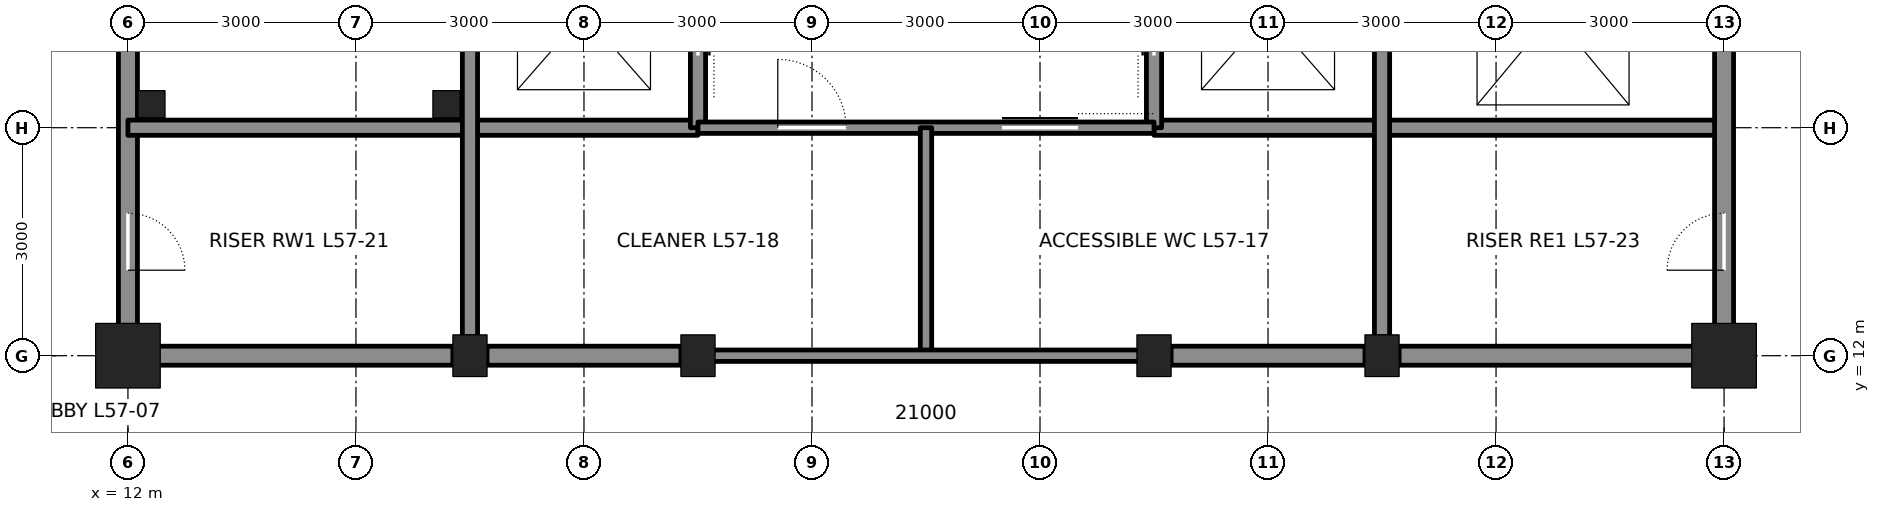
"""IFC4 building model, lengths in metres.
Left out: names, types, materials, properties, quantities, classifications, styles, units other than length and angle.
Written with IfcOpenShell. Run it as: python <this file> out.ifc"""

import sys

from ifc_helpers import new_model, si_unit, direction, frame, frame_2d, origin, origin_2d, place, context, subcontext, project, spatial, rectangle, hollow_rectangle, i_section, extrude, element, fill, save


model = new_model("IFC4")
c1 = context("Model", 3, precision=1e-05, world=origin(), true_north=direction((0.0, 1.0)))
c2 = subcontext(c1, "Body", "Model", "MODEL_VIEW")
j1 = project(units=[si_unit("LENGTHUNIT", "METRE"), si_unit("PLANEANGLEUNIT", "RADIAN")], contexts=[c1])
p1 = place(None, origin())
s1 = spatial("IfcSite", under=j1, at=p1, CompositionType="ELEMENT")
p2 = place(p1, origin())
s2 = spatial("IfcBuilding", under=s1, at=p2, CompositionType="ELEMENT")
p3 = place(p2, frame((0.0, 0.0, 257.7)))
s3 = spatial("IfcBuildingStorey", under=s2, at=p3, CompositionType="ELEMENT", Elevation=257.7)
p4 = place(p3, frame((12.0, 12.0, 0.0), z_axis=(0.0, 0.0, 1.0), x_axis=(1.0, 0.0, 0.0)))
e1 = element("IfcColumn", 1, at=p4, inside=s3, PredefinedType="COLUMN", context=c2, shape_type="SweptSolid", body=[
    extrude(hollow_rectangle(XDim=0.85, YDim=0.85, WallThickness=0.085, at=origin_2d()), origin(), (0.0, 0.0, 1.0), 4.5),
])
for number, where, z_axis, x_axis in (
    (2, (16.5, 12.0, 0.0), (0.0, 0.0, 1.0), (1.0, 0.0, 0.0)),
    (3, (19.5, 12.0, 0.0), (0.0, 0.0, 1.0), (1.0, 0.0, 0.0)),
    (4, (25.5, 12.0, 0.0), (0.0, 0.0, 1.0), (1.0, 0.0, 0.0)),
    (5, (28.5, 12.0, 0.0), (0.0, 0.0, 1.0), (1.0, 0.0, 0.0)),
):
    element("IfcColumn", number, at=place(p3, frame(where, z_axis=z_axis, x_axis=x_axis)), inside=s3, PredefinedType="COLUMN", context=c2, shape_type="SweptSolid", body=[
        extrude(i_section(OverallWidth=0.449, OverallDepth=0.549, WebThickness=0.072, FlangeThickness=0.115, at=origin_2d()), origin(), (0.0, 0.0, 1.0), 4.5),
    ])
p5 = place(p3, frame((33.0, 12.0, 0.0), z_axis=(0.0, 0.0, 1.0), x_axis=(1.0, 0.0, 0.0)))
e6 = element("IfcColumn", 6, at=p5, inside=s3, PredefinedType="COLUMN", context=c2, shape_type="SweptSolid", body=[
    extrude(hollow_rectangle(XDim=0.85, YDim=0.85, WallThickness=0.085, at=origin_2d()), origin(), (0.0, 0.0, 1.0), 4.5),
])
p6 = place(p3, frame((12.0, 12.25, 0.0), z_axis=(0.0, 0.0, 1.0), x_axis=(0.0, 1.0, 0.0)))
e7 = element("IfcWall", 7, at=p6, inside=s3, PredefinedType="SOLIDWALL", context=c2, shape_type="SweptSolid", body=[
    extrude(rectangle(XDim=8.5, YDim=0.25, at=frame_2d((4.25, 0.0))), origin(), (0.0, 0.0, 1.0), 3.413),
])
p7 = place(p6, frame((0.875, 0.0, 0.0)))
e8 = element("IfcOpeningElement", 8, at=p7, cuts=e7, PredefinedType="OPENING", context=c2, shape_type="SweptSolid", body=[
    extrude(rectangle(XDim=0.75, YDim=2.1, at=frame_2d((0.375, 1.05))), frame((0.0, 0.135, 0.0), z_axis=(0.0, -1.0, 0.0), x_axis=(1.0, 0.0, 0.0)), (0.0, 0.0, 1.0), 0.27),
])
p8 = place(p3, frame((12.25, 12.0, 0.0), z_axis=(0.0, 0.0, 1.0), x_axis=(1.0, 0.0, 0.0)))
e9 = element("IfcWall", 9, at=p8, inside=s3, PredefinedType="SOLIDWALL", context=c2, shape_type="SweptSolid", body=[
    extrude(rectangle(XDim=4.025, YDim=0.25, at=frame_2d((2.013, 0.0))), origin(), (0.0, 0.0, 1.0), 3.481),
])
for number, where, z_axis, x_axis in (
    (10, (16.725, 12.0, 0.0), (0.0, 0.0, 1.0), (1.0, 0.0, 0.0)),
    (11, (25.725, 12.0, 0.0), (0.0, 0.0, 1.0), (1.0, 0.0, 0.0)),
):
    element("IfcWall", number, at=place(p3, frame(where, z_axis=z_axis, x_axis=x_axis)), inside=s3, PredefinedType="SOLIDWALL", context=c2, shape_type="SweptSolid", body=[
        extrude(rectangle(XDim=2.55, YDim=0.25, at=frame_2d((1.275, 0.0))), origin(), (0.0, 0.0, 1.0), 3.481),
    ])
p9 = place(p3, frame((28.725, 12.0, 0.0), z_axis=(0.0, 0.0, 1.0), x_axis=(1.0, 0.0, 0.0)))
e12 = element("IfcWall", 12, at=p9, inside=s3, PredefinedType="SOLIDWALL", context=c2, shape_type="SweptSolid", body=[
    extrude(rectangle(XDim=4.025, YDim=0.25, at=frame_2d((2.013, 0.0))), origin(), (0.0, 0.0, 1.0), 3.481),
])
for number, where, z_axis, x_axis in (
    (13, (12.0, 15.0, 0.0), (0.0, 0.0, 1.0), (1.0, 0.0, 0.0)),
    (14, (25.5, 15.0, 0.0), (0.0, 0.0, 1.0), (1.0, 0.0, 0.0)),
):
    element("IfcWall", number, at=place(p3, frame(where, z_axis=z_axis, x_axis=x_axis)), inside=s3, PredefinedType="SOLIDWALL", context=c2, shape_type="SweptSolid", body=[
        extrude(rectangle(XDim=7.5, YDim=0.2, at=frame_2d((3.75, 0.0))), origin(), (0.0, 0.0, 1.0), 4.34),
    ])
p10 = place(p3, frame((16.5, 12.25, 0.0), z_axis=(0.0, 0.0, 1.0), x_axis=(0.0, 1.0, 0.0)))
e15 = element("IfcWall", 15, at=p10, inside=s3, PredefinedType="SOLIDWALL", context=c2, shape_type="SweptSolid", body=[
    extrude(rectangle(XDim=8.5, YDim=0.2, at=frame_2d((4.25, 0.0))), origin(), (0.0, 0.0, 1.0), 3.413),
])
p11 = place(p3, frame((19.5, 15.0, 0.0), z_axis=(0.0, 0.0, 1.0), x_axis=(0.0, 1.0, 0.0)))
e16 = element("IfcWall", 16, at=p11, inside=s3, PredefinedType="SOLIDWALL", context=c2, shape_type="SweptSolid", body=[
    extrude(rectangle(XDim=12.0, YDim=0.2, at=frame_2d((6.0, 0.0))), origin(), (0.0, 0.0, 1.0), 3.365),
])
p12 = place(p11, frame((0.95, 0.0, 0.0)))
e17 = element("IfcOpeningElement", 17, at=p12, cuts=e16, PredefinedType="OPENING", context=c2, shape_type="SweptSolid", body=[
    extrude(rectangle(XDim=1.1, YDim=2.1, at=frame_2d((0.55, 1.05))), frame((0.0, 0.11, 0.0), z_axis=(0.0, -1.0, 0.0), x_axis=(1.0, 0.0, 0.0)), (0.0, 0.0, 1.0), 0.22),
])
p13 = place(p11, frame((3.95, 0.0, 0.0)))
e18 = element("IfcOpeningElement", 18, at=p13, cuts=e16, PredefinedType="OPENING", context=c2, shape_type="SweptSolid", body=[
    extrude(rectangle(XDim=1.1, YDim=2.1, at=frame_2d((0.55, 1.05))), frame((0.0, 0.11, 0.0), z_axis=(0.0, -1.0, 0.0), x_axis=(1.0, 0.0, 0.0)), (0.0, 0.0, 1.0), 0.22),
])
p14 = place(p11, frame((6.95, 0.0, 0.0)))
e19 = element("IfcOpeningElement", 19, at=p14, cuts=e16, PredefinedType="OPENING", context=c2, shape_type="SweptSolid", body=[
    extrude(rectangle(XDim=1.1, YDim=2.1, at=frame_2d((0.55, 1.05))), frame((0.0, 0.11, 0.0), z_axis=(0.0, -1.0, 0.0), x_axis=(1.0, 0.0, 0.0)), (0.0, 0.0, 1.0), 0.22),
])
p15 = place(p11, frame((9.95, 0.0, 0.0)))
e20 = element("IfcOpeningElement", 20, at=p15, cuts=e16, PredefinedType="OPENING", context=c2, shape_type="SweptSolid", body=[
    extrude(rectangle(XDim=1.1, YDim=2.1, at=frame_2d((0.55, 1.05))), frame((0.0, 0.11, 0.0), z_axis=(0.0, -1.0, 0.0), x_axis=(1.0, 0.0, 0.0)), (0.0, 0.0, 1.0), 0.22),
])
p16 = place(p3, frame((25.5, 15.0, 0.0), z_axis=(0.0, 0.0, 1.0), x_axis=(0.0, 1.0, 0.0)))
e21 = element("IfcWall", 21, at=p16, inside=s3, PredefinedType="SOLIDWALL", context=c2, shape_type="SweptSolid", body=[
    extrude(rectangle(XDim=12.0, YDim=0.2, at=frame_2d((6.0, 0.0))), origin(), (0.0, 0.0, 1.0), 3.365),
])
p17 = place(p16, frame((0.95, 0.0, 0.0)))
e22 = element("IfcOpeningElement", 22, at=p17, cuts=e21, PredefinedType="OPENING", context=c2, shape_type="SweptSolid", body=[
    extrude(rectangle(XDim=1.1, YDim=2.1, at=frame_2d((0.55, 1.05))), frame((0.0, 0.11, 0.0), z_axis=(0.0, -1.0, 0.0), x_axis=(1.0, 0.0, 0.0)), (0.0, 0.0, 1.0), 0.22),
])
p18 = place(p16, frame((3.95, 0.0, 0.0)))
e23 = element("IfcOpeningElement", 23, at=p18, cuts=e21, PredefinedType="OPENING", context=c2, shape_type="SweptSolid", body=[
    extrude(rectangle(XDim=1.1, YDim=2.1, at=frame_2d((0.55, 1.05))), frame((0.0, 0.11, 0.0), z_axis=(0.0, -1.0, 0.0), x_axis=(1.0, 0.0, 0.0)), (0.0, 0.0, 1.0), 0.22),
])
p19 = place(p16, frame((6.95, 0.0, 0.0)))
e24 = element("IfcOpeningElement", 24, at=p19, cuts=e21, PredefinedType="OPENING", context=c2, shape_type="SweptSolid", body=[
    extrude(rectangle(XDim=1.1, YDim=2.1, at=frame_2d((0.55, 1.05))), frame((0.0, 0.11, 0.0), z_axis=(0.0, -1.0, 0.0), x_axis=(1.0, 0.0, 0.0)), (0.0, 0.0, 1.0), 0.22),
])
p20 = place(p16, frame((9.95, 0.0, 0.0)))
e25 = element("IfcOpeningElement", 25, at=p20, cuts=e21, PredefinedType="OPENING", context=c2, shape_type="SweptSolid", body=[
    extrude(rectangle(XDim=1.1, YDim=2.1, at=frame_2d((0.55, 1.05))), frame((0.0, 0.11, 0.0), z_axis=(0.0, -1.0, 0.0), x_axis=(1.0, 0.0, 0.0)), (0.0, 0.0, 1.0), 0.22),
])
p21 = place(p3, frame((28.5, 12.25, 0.0), z_axis=(0.0, 0.0, 1.0), x_axis=(0.0, 1.0, 0.0)))
e26 = element("IfcWall", 26, at=p21, inside=s3, PredefinedType="SOLIDWALL", context=c2, shape_type="SweptSolid", body=[
    extrude(rectangle(XDim=8.5, YDim=0.2, at=frame_2d((4.25, 0.0))), origin(), (0.0, 0.0, 1.0), 3.413),
])
p22 = place(p3, frame((33.0, 12.25, 0.0), z_axis=(0.0, 0.0, 1.0), x_axis=(0.0, 1.0, 0.0)))
e27 = element("IfcWall", 27, at=p22, inside=s3, PredefinedType="SOLIDWALL", context=c2, shape_type="SweptSolid", body=[
    extrude(rectangle(XDim=8.5, YDim=0.25, at=frame_2d((4.25, 0.0))), origin(), (0.0, 0.0, 1.0), 3.413),
])
p23 = place(p22, frame((6.65, 0.0, 0.0)))
e28 = element("IfcOpeningElement", 28, at=p23, cuts=e27, PredefinedType="OPENING", context=c2, shape_type="SweptSolid", body=[
    extrude(rectangle(XDim=1.2, YDim=2.1, at=frame_2d((0.6, 1.05))), frame((0.0, 0.135, 0.0), z_axis=(0.0, -1.0, 0.0), x_axis=(1.0, 0.0, 0.0)), (0.0, 0.0, 1.0), 0.27),
])
p24 = place(p22, frame((0.875, 0.0, 0.0)))
e29 = element("IfcOpeningElement", 29, at=p24, cuts=e27, PredefinedType="OPENING", context=c2, shape_type="SweptSolid", body=[
    extrude(rectangle(XDim=0.75, YDim=2.1, at=frame_2d((0.375, 1.05))), frame((0.0, 0.135, 0.0), z_axis=(0.0, -1.0, 0.0), x_axis=(1.0, 0.0, 0.0)), (0.0, 0.0, 1.0), 0.27),
])
p25 = place(p3, frame((19.5, 15.0, 0.0), z_axis=(0.0, 0.0, 1.0), x_axis=(1.0, 0.0, 0.0)))
e30 = element("IfcWall", 30, at=p25, inside=s3, PredefinedType="PARTITIONING", context=c2, shape_type="SweptSolid", body=[
    extrude(rectangle(XDim=6.0, YDim=0.15, at=frame_2d((3.0, 0.0))), origin(), (0.0, 0.0, 1.0), 4.34),
])
p26 = place(p25, frame((4.0, 0.0, 0.0)))
e31 = element("IfcOpeningElement", 31, at=p26, cuts=e30, PredefinedType="OPENING", context=c2, shape_type="SweptSolid", body=[
    extrude(rectangle(XDim=1.0, YDim=2.1, at=frame_2d((0.5, 1.05))), frame((0.0, 0.085, 0.0), z_axis=(0.0, -1.0, 0.0), x_axis=(1.0, 0.0, 0.0)), (0.0, 0.0, 1.0), 0.17),
])
p27 = place(p25, frame((1.05, 0.0, 0.0)))
e32 = element("IfcOpeningElement", 32, at=p27, cuts=e30, PredefinedType="OPENING", context=c2, shape_type="SweptSolid", body=[
    extrude(rectangle(XDim=0.9, YDim=2.1, at=frame_2d((0.45, 1.05))), frame((0.0, 0.085, 0.0), z_axis=(0.0, -1.0, 0.0), x_axis=(1.0, 0.0, 0.0)), (0.0, 0.0, 1.0), 0.17),
])
p28 = place(p3, frame((22.5, 15.0, 0.0), z_axis=(0.0, 0.0, 1.0), x_axis=(0.0, -1.0, 0.0)))
e33 = element("IfcWall", 33, at=p28, inside=s3, PredefinedType="PARTITIONING", context=c2, shape_type="SweptSolid", body=[
    extrude(rectangle(XDim=3.0, YDim=0.15, at=frame_2d((1.5, 0.0))), origin(), (0.0, 0.0, 1.0), 4.34),
])
p29 = place(p3, frame((19.5, 12.0, 0.0), z_axis=(0.0, 0.0, 1.0), x_axis=(1.0, 0.0, 0.0)))
e34 = element("IfcWall", 34, at=p29, inside=s3, PredefinedType="PARTITIONING", context=c2, shape_type="SweptSolid", body=[
    extrude(rectangle(XDim=6.0, YDim=0.15, at=frame_2d((3.0, 0.0))), origin(), (0.0, 0.0, 1.0), 3.481),
])
for number, where, z_axis, x_axis in (
    (35, (12.31, 15.31, 0.0), (0.0, 0.0, 1.0), (1.0, 0.0, 0.0)),
    (36, (16.19, 15.31, 0.0), (0.0, 0.0, 1.0), (1.0, 0.0, 0.0)),
):
    element("IfcColumn", number, at=place(p3, frame(where, z_axis=z_axis, x_axis=x_axis)), inside=s3, PredefinedType="COLUMN", context=c2, shape_type="SweptSolid", body=[
        extrude(hollow_rectangle(XDim=0.356, YDim=0.356, WallThickness=0.009, at=origin_2d()), origin(), (0.0, 0.0, 1.0), 4.5),
    ])
p30 = place(p7, frame((0.75, 0.0, 0.0), z_axis=(0.0, 0.0, 1.0), x_axis=(-1.0, 0.0, 0.0)))
e37 = element("IfcDoor", 37, at=p30, inside=s3, OperationType="SINGLE_SWING_RIGHT", PredefinedType="DOOR", context=c2, shape_type="SweptSolid", body=[
    extrude(rectangle(XDim=0.75, YDim=2.1, at=frame_2d((0.375, 1.05))), frame((0.0, 0.025, 0.0), z_axis=(0.0, -1.0, 0.0), x_axis=(1.0, 0.0, 0.0)), (0.0, 0.0, 1.0), 0.05),
])
fill(e8, e37)
p31 = place(p24, origin())
e38 = element("IfcDoor", 38, at=p31, inside=s3, OperationType="SINGLE_SWING_LEFT", PredefinedType="DOOR", context=c2, shape_type="SweptSolid", body=[
    extrude(rectangle(XDim=0.75, YDim=2.1, at=frame_2d((0.375, 1.05))), frame((0.0, 0.025, 0.0), z_axis=(0.0, -1.0, 0.0), x_axis=(1.0, 0.0, 0.0)), (0.0, 0.0, 1.0), 0.05),
])
fill(e29, e38)
p32 = place(p26, origin())
e39 = element("IfcDoor", 39, at=p32, inside=s3, OperationType="SLIDING_TO_LEFT", PredefinedType="DOOR", context=c2, shape_type="SweptSolid", body=[
    extrude(rectangle(XDim=1.0, YDim=2.1, at=frame_2d((0.5, 1.05))), frame((0.0, 0.025, 0.0), z_axis=(0.0, -1.0, 0.0), x_axis=(1.0, 0.0, 0.0)), (0.0, 0.0, 1.0), 0.05),
])
fill(e31, e39)
p33 = place(p27, origin())
e40 = element("IfcDoor", 40, at=p33, inside=s3, OperationType="SINGLE_SWING_LEFT", PredefinedType="DOOR", context=c2, shape_type="SweptSolid", body=[
    extrude(rectangle(XDim=0.9, YDim=2.1, at=frame_2d((0.45, 1.05))), frame((0.0, 0.025, 0.0), z_axis=(0.0, -1.0, 0.0), x_axis=(1.0, 0.0, 0.0)), (0.0, 0.0, 1.0), 0.05),
])
fill(e32, e40)
p34 = place(p12, origin())
e41 = element("IfcDoor", 41, at=p34, inside=s3, OperationType="DOUBLE_DOOR_SLIDING", PredefinedType="DOOR", context=c2, shape_type="SweptSolid", body=[
    extrude(rectangle(XDim=1.1, YDim=2.1, at=frame_2d((0.55, 1.05))), frame((0.0, 0.025, 0.0), z_axis=(0.0, -1.0, 0.0), x_axis=(1.0, 0.0, 0.0)), (0.0, 0.0, 1.0), 0.05),
])
fill(e17, e41)
p35 = place(p17, origin())
e42 = element("IfcDoor", 42, at=p35, inside=s3, OperationType="DOUBLE_DOOR_SLIDING", PredefinedType="DOOR", context=c2, shape_type="SweptSolid", body=[
    extrude(rectangle(XDim=1.1, YDim=2.1, at=frame_2d((0.55, 1.05))), frame((0.0, 0.025, 0.0), z_axis=(0.0, -1.0, 0.0), x_axis=(1.0, 0.0, 0.0)), (0.0, 0.0, 1.0), 0.05),
])
fill(e22, e42)
save(model, sys.argv[1])
